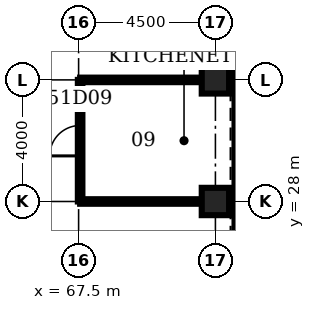
"""IFC4 building model, lengths in metres.
Left out: names, types, materials, properties, quantities, classifications, styles, units other than length and angle.
Written with IfcOpenShell. Run it as: python <this file> out.ifc"""

import sys

from ifc_helpers import new_model, si_unit, direction, frame, frame_2d, origin, origin_2d, place, context, subcontext, project, spatial, rectangle, hollow_rectangle, extrude, element, fill, save


model = new_model("IFC4")
c1 = context("Model", 3, precision=1e-05, world=origin(), true_north=direction((0.0, 1.0)))
c2 = subcontext(c1, "Body", "Model", "MODEL_VIEW")
j1 = project(units=[si_unit("LENGTHUNIT", "METRE"), si_unit("PLANEANGLEUNIT", "RADIAN")], contexts=[c1])
p1 = place(None, origin())
s1 = spatial("IfcSite", under=j1, at=p1, CompositionType="ELEMENT")
p2 = place(p1, origin())
s2 = spatial("IfcBuilding", under=s1, at=p2, CompositionType="ELEMENT")
p3 = place(p2, frame((0.0, 0.0, 227.8)))
s3 = spatial("IfcBuildingStorey", under=s2, at=p3, CompositionType="ELEMENT", Elevation=227.8)
for number, where, z_axis, x_axis in (
    (1, (72.0, 28.0, 0.0), (0.0, 0.0, 1.0), (1.0, 0.0, 0.0)),
    (2, (72.0, 32.0, 0.0), (0.0, 0.0, 1.0), (1.0, 0.0, 0.0)),
):
    element("IfcColumn", number, at=place(p3, frame(where, z_axis=z_axis, x_axis=x_axis)), inside=s3, PredefinedType="COLUMN", context=c2, shape_type="SweptSolid", body=[
        extrude(hollow_rectangle(XDim=0.9, YDim=0.9, WallThickness=0.08, at=origin_2d()), origin(), (0.0, 0.0, 1.0), 4.2),
    ])
for number, where, z_axis, x_axis in (
    (3, (67.55, 28.0, 0.0), (0.0, 0.0, 1.0), (1.0, 0.0, 0.0)),
    (4, (67.55, 32.0, 0.0), (0.0, 0.0, 1.0), (1.0, 0.0, 0.0)),
):
    element("IfcWall", number, at=place(p3, frame(where, z_axis=z_axis, x_axis=x_axis)), inside=s3, PredefinedType="PARTITIONING", context=c2, shape_type="SweptSolid", body=[
        extrude(rectangle(XDim=4.0, YDim=0.15, at=frame_2d((2.0, 0.0))), origin(), (0.0, 0.0, 1.0), 3.0),
    ])
p4 = place(p3, frame((67.55, 28.0, 0.0), z_axis=(0.0, 0.0, 1.0), x_axis=(0.0, 1.0, 0.0)))
e5 = element("IfcWall", 5, at=p4, inside=s3, PredefinedType="PARTITIONING", context=c2, shape_type="SweptSolid", body=[
    extrude(rectangle(XDim=4.0, YDim=0.15, at=frame_2d((2.0, 0.0))), origin(), (0.0, 0.0, 1.0), 3.0),
])
p5 = place(p4, frame((1.5, 0.0, 0.0)))
e6 = element("IfcOpeningElement", 6, at=p5, cuts=e5, PredefinedType="OPENING", context=c2, shape_type="SweptSolid", body=[
    extrude(rectangle(XDim=1.0, YDim=2.1, at=frame_2d((0.5, 1.05))), frame((0.0, 0.085, 0.0), z_axis=(0.0, -1.0, 0.0), x_axis=(1.0, 0.0, 0.0)), (0.0, 0.0, 1.0), 0.17),
])
p6 = place(p5, origin())
e7 = element("IfcDoor", 7, at=p6, inside=s3, OperationType="SINGLE_SWING_LEFT", PredefinedType="DOOR", context=c2, shape_type="SweptSolid", body=[
    extrude(rectangle(XDim=1.0, YDim=2.1, at=frame_2d((0.5, 1.05))), frame((0.0, 0.025, 0.0), z_axis=(0.0, -1.0, 0.0), x_axis=(1.0, 0.0, 0.0)), (0.0, 0.0, 1.0), 0.05),
])
fill(e6, e7)
save(model, sys.argv[1])
